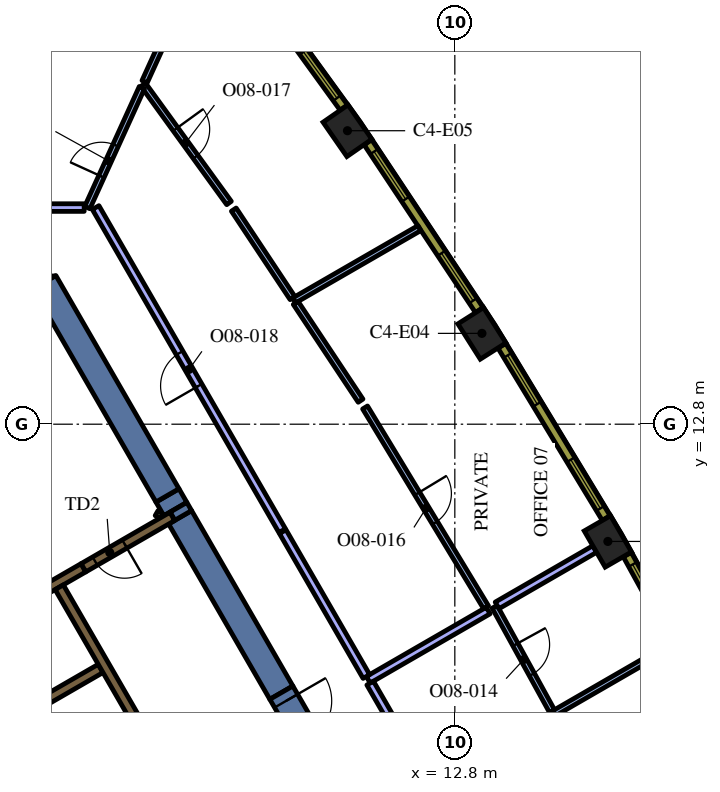
"""IFC4 building model, lengths in metres.
Left out: names, types, materials, properties, quantities, classifications, styles, units other than length and angle.
Written with IfcOpenShell. Run it as: python <this file> out.ifc"""

import sys

from ifc_helpers import new_model, si_unit, direction, frame, frame_2d, origin, origin_2d, place, context, subcontext, project, spatial, polyline, rectangle, outline, extrude, element, fill, save


model = new_model("IFC4")
c1 = context("Model", 3, precision=1e-05, world=origin(), true_north=direction((0.0, 1.0)))
c2 = subcontext(c1, "Body", "Model", "MODEL_VIEW")
j1 = project(units=[si_unit("LENGTHUNIT", "METRE"), si_unit("PLANEANGLEUNIT", "RADIAN")], contexts=[c1])
p1 = place(None, origin())
s1 = spatial("IfcSite", under=j1, at=p1, CompositionType="ELEMENT")
p2 = place(p1, origin())
s2 = spatial("IfcBuilding", under=s1, at=p2, CompositionType="ELEMENT")
p3 = place(p2, frame((0.0, 0.0, 226.8)))
s3 = spatial("IfcBuildingStorey", under=s2, at=p3, CompositionType="ELEMENT", Elevation=226.8)
for number, where, z_axis, x_axis in (
    (1, (16.827, 9.715, 0.0), (0.0, 0.0, 1.0), (-0.5, 0.866, 0.0)),
    (2, (13.513, 15.19, 0.0), (0.0, 0.0, 1.0), (-0.536, 0.845, 0.0)),
    (3, (9.975, 20.522, 0.0), (0.0, 0.0, 1.0), (-0.57, 0.822, 0.0)),
):
    element("IfcColumn", number, at=place(p3, frame(where, z_axis=z_axis, x_axis=x_axis)), inside=s3, PredefinedType="COLUMN", context=c2, shape_type="SweptSolid", body=[
        extrude(rectangle(XDim=1.1, YDim=0.8, at=origin_2d()), origin(), (0.0, 0.0, 1.0), 4.2),
    ])
p4 = place(p3, frame((5.445, 10.569, 0.0), z_axis=(0.0, 0.0, 1.0), x_axis=(-0.500218351069, 0.865899302029, 0.0)))
e4 = element("IfcWall", 4, at=p4, inside=s3, PredefinedType="SOLIDWALL", context=c2, shape_type="SweptSolid", body=[
    extrude(rectangle(XDim=0.412, YDim=0.7, at=frame_2d((0.206, 0.0))), origin(), (0.0, 0.0, 1.0), 4.2),
])
p5 = place(p3, frame((5.571, 10.35, 0.0), z_axis=(0.0, 0.0, 1.0), x_axis=(0.499968379186, -0.8660436593, 0.0)))
e5 = element("IfcWall", 5, at=p5, inside=s3, PredefinedType="SOLIDWALL", context=c2, shape_type="SweptSolid", body=[
    extrude(rectangle(XDim=5.328, YDim=0.7, at=frame_2d((2.664, 0.0))), origin(), (0.0, 0.0, 1.0), 4.2),
])
p6 = place(p3, origin())
e6 = element("IfcWall", 6, at=p6, inside=s3, PredefinedType="SOLIDWALL", context=c2, shape_type="SweptSolid", body=[
    extrude(outline(polyline([(5.432, 10.272), (5.308, 10.487), (5.749, 10.742), (5.873, 10.527), (5.432, 10.272)])), origin(), (0.0, 0.0, 1.0), 4.2),
])
p7 = place(p3, frame((5.238, 10.927, 0.0), z_axis=(0.0, 0.0, 1.0), x_axis=(-0.499985607887, 0.866033712915, 0.0)))
e7 = element("IfcWall", 7, at=p7, inside=s3, PredefinedType="SOLIDWALL", context=c2, shape_type="SweptSolid", body=[
    extrude(rectangle(XDim=6.478, YDim=0.7, at=frame_2d((3.239, 0.0))), origin(), (0.0, 0.0, 1.0), 4.2),
])
e8 = element("IfcWall", 8, at=p6, inside=s3, PredefinedType="SOLIDWALL", context=c2, shape_type="SweptSolid", body=[
    extrude(outline(polyline([(1.501, 16.7), (2.277, 16.7), (1.695, 16.364), (1.501, 16.7)])), origin(), (0.0, 0.0, 1.0), 4.2),
])
p8 = place(p3, frame((3.028, 9.023, 0.0), z_axis=(0.0, 0.0, 1.0), x_axis=(-0.866036587186, -0.49998062928, 0.0)))
e9 = element("IfcWall", 9, at=p8, inside=s3, PredefinedType="SOLIDWALL", context=c2, shape_type="SweptSolid", body=[
    extrude(rectangle(XDim=3.384, YDim=0.25, at=frame_2d((1.692, 0.0))), origin(), (0.0, 0.0, 1.0), 4.2),
])
p9 = place(p3, frame((5.97, -2.591, 0.0), z_axis=(0.0, 0.0, 1.0), x_axis=(-0.499994469932, 0.866028596547, 0.0)))
e10 = element("IfcWall", 10, at=p9, inside=s3, PredefinedType="SOLIDWALL", context=c2, shape_type="SweptSolid", body=[
    extrude(rectangle(XDim=10.488, YDim=0.25, at=frame_2d((5.244, 0.0))), origin(), (0.0, 0.0, 1.0), 4.2),
])
p10 = place(p3, frame((1.574, 5.274, 0.0), z_axis=(0.0, 0.0, 1.0), x_axis=(0.866028486751, 0.499994660107, 0.0)))
e11 = element("IfcWall", 11, at=p10, inside=s3, PredefinedType="SOLIDWALL", context=c2, shape_type="SweptSolid", body=[
    extrude(rectangle(XDim=2.2, YDim=0.25, at=frame_2d((1.1, 0.0))), origin(), (0.0, 0.0, 1.0), 4.2),
])
p11 = place(p3, frame((4.98, 10.358, 0.0), z_axis=(0.0, 0.0, 1.0), x_axis=(0.500640202437, 0.86565546709, 0.0)))
e12 = element("IfcWall", 12, at=p11, inside=s3, PredefinedType="PARTITIONING", context=c2, shape_type="SweptSolid", body=[
    extrude(rectangle(XDim=0.146, YDim=0.15, at=frame_2d((0.073, 0.0))), origin(), (0.0, 0.0, 1.0), 3.45),
])
p12 = place(p3, frame((8.565, -2.185, 0.0), z_axis=(0.0, 0.0, 1.0), x_axis=(-0.499997954832, 0.866026584559, 0.0)))
e13 = element("IfcWall", 13, at=p12, inside=s3, PredefinedType="SOLIDWALL", context=c2, shape_type="SweptSolid", body=[
    extrude(rectangle(XDim=12.35, YDim=0.25, at=frame_2d((6.175, 0.0))), origin(), (0.0, 0.0, 1.0), 4.2),
])
p13 = place(p12, frame((0.585, 0.0, 0.0)))
e14 = element("IfcOpeningElement", 14, at=p13, cuts=e13, PredefinedType="OPENING", context=c2, shape_type="SweptSolid", body=[
    extrude(rectangle(XDim=1.1, YDim=2.1, at=frame_2d((0.55, 1.05))), frame((0.0, 0.135, 0.0), z_axis=(0.0, -1.0, 0.0), x_axis=(1.0, 0.0, 0.0)), (0.0, 0.0, 1.0), 0.27),
])
p14 = place(p3, frame((5.366, 10.373, 0.0), z_axis=(0.0, 0.0, 1.0), x_axis=(-0.866019956843, -0.50000943426, 0.0)))
e15 = element("IfcWall", 15, at=p14, inside=s3, PredefinedType="SOLIDWALL", context=c2, shape_type="SweptSolid", body=[
    extrude(rectangle(XDim=2.7, YDim=0.25, at=frame_2d((1.35, 0.0))), origin(), (0.0, 0.0, 1.0), 4.2),
])
p15 = place(p14, frame((1.45, 0.0, 0.0)))
e16 = element("IfcOpeningElement", 16, at=p15, cuts=e15, PredefinedType="OPENING", context=c2, shape_type="SweptSolid", body=[
    extrude(rectangle(XDim=0.9, YDim=2.1, at=frame_2d((0.45, 1.05))), frame((0.0, 0.135, 0.0), z_axis=(0.0, -1.0, 0.0), x_axis=(1.0, 0.0, 0.0)), (0.0, 0.0, 1.0), 0.27),
])
p16 = place(p3, frame((8.235, 5.736, 0.0), z_axis=(0.0, 0.0, 1.0), x_axis=(0.499954529098, -0.86605165483, 0.0)))
e17 = element("IfcWall", 17, at=p16, inside=s3, PredefinedType="SOLIDWALL", context=c2, shape_type="SweptSolid", body=[
    extrude(rectangle(XDim=1.7, YDim=0.7, at=frame_2d((0.85, 0.0))), origin(), (0.0, 0.0, 1.0), 4.2),
])
p17 = place(p16, frame((0.25, 0.0, 0.0)))
e18 = element("IfcOpeningElement", 18, at=p17, cuts=e17, PredefinedType="OPENING", context=c2, shape_type="SweptSolid", body=[
    extrude(rectangle(XDim=1.2, YDim=2.1, at=frame_2d((0.6, 1.05))), frame((0.0, 0.36, 0.0), z_axis=(0.0, -1.0, 0.0), x_axis=(1.0, 0.0, 0.0)), (0.0, 0.0, 1.0), 0.72),
])
p18 = place(p3, frame((15.394, 5.183, 0.0), z_axis=(0.0, 0.0, 1.0), x_axis=(0.866039935929, 0.499974828743, 0.0)))
e19 = element("IfcWall", 19, at=p18, inside=s3, PredefinedType="PARTITIONING", context=c2, shape_type="SweptSolid", body=[
    extrude(rectangle(XDim=3.601, YDim=0.15, at=frame_2d((1.8, 0.0))), origin(), (0.0, 0.0, 1.0), 3.45),
])
p19 = place(p3, frame((13.848, 7.995, 0.0), z_axis=(0.0, 0.0, 1.0), x_axis=(0.481894826099, -0.876229066272, 0.0)))
e20 = element("IfcWall", 20, at=p19, inside=s3, PredefinedType="PARTITIONING", context=c2, shape_type="SweptSolid", body=[
    extrude(rectangle(XDim=3.134, YDim=0.15, at=frame_2d((1.567, 0.0))), origin(), (0.0, 0.0, 1.0), 3.45),
])
p20 = place(p19, frame((1.134, 0.0, 0.0)))
e21 = element("IfcOpeningElement", 21, at=p20, cuts=e20, PredefinedType="OPENING", context=c2, shape_type="SweptSolid", body=[
    extrude(rectangle(XDim=0.9, YDim=2.1, at=frame_2d((0.45, 1.05))), frame((0.0, 0.085, 0.0), z_axis=(0.0, -1.0, 0.0), x_axis=(1.0, 0.0, 0.0)), (0.0, 0.0, 1.0), 0.17),
])
p21 = place(p3, frame((13.913, 8.032, 0.0), z_axis=(0.0, 0.0, 1.0), x_axis=(0.866015594979, 0.500016988964, 0.0)))
e22 = element("IfcWall", 22, at=p21, inside=s3, PredefinedType="PARTITIONING", context=c2, shape_type="SweptSolid", body=[
    extrude(rectangle(XDim=2.966, YDim=0.2, at=frame_2d((1.483, 0.0))), origin(), (0.0, 0.0, 1.0), 3.45),
])
p22 = place(p3, frame((10.522, 6.075, 0.0), z_axis=(0.0, 0.0, 1.0), x_axis=(0.866003708037, 0.500037576254, 0.0)))
e23 = element("IfcWall", 23, at=p22, inside=s3, PredefinedType="PARTITIONING", context=c2, shape_type="SweptSolid", body=[
    extrude(rectangle(XDim=3.644, YDim=0.2, at=frame_2d((1.822, 0.0))), origin(), (0.0, 0.0, 1.0), 3.45),
])
p23 = place(p3, frame((12.772, 2.178, 0.0), z_axis=(0.0, 0.0, 1.0), x_axis=(-0.50001224981, 0.866018331238, 0.0)))
e24 = element("IfcWall", 24, at=p23, inside=s3, PredefinedType="PARTITIONING", context=c2, shape_type="SweptSolid", body=[
    extrude(rectangle(XDim=4.4, YDim=0.2, at=frame_2d((2.2, 0.0))), origin(), (0.0, 0.0, 1.0), 3.45),
])
p24 = place(p3, frame((8.57, 16.056, 0.0), z_axis=(0.0, 0.0, 1.0), x_axis=(0.866000839906, 0.500042543472, 0.0)))
e25 = element("IfcWall", 25, at=p24, inside=s3, PredefinedType="PARTITIONING", context=c2, shape_type="SweptSolid", body=[
    extrude(rectangle(XDim=3.807, YDim=0.15, at=frame_2d((1.904, 0.0))), origin(), (0.0, 0.0, 1.0), 3.45),
])
p25 = place(p3, frame((10.439, 13.24, 0.0), z_axis=(0.0, 0.0, 1.0), x_axis=(0.517837859082, -0.855478785068, 0.0)))
e26 = element("IfcWall", 26, at=p25, inside=s3, PredefinedType="PARTITIONING", context=c2, shape_type="SweptSolid", body=[
    extrude(rectangle(XDim=6.148, YDim=0.15, at=frame_2d((3.074, 0.0))), origin(), (0.0, 0.0, 1.0), 3.45),
])
p26 = place(p25, frame((2.648, 0.0, 0.0)))
e27 = element("IfcOpeningElement", 27, at=p26, cuts=e26, PredefinedType="OPENING", context=c2, shape_type="SweptSolid", body=[
    extrude(rectangle(XDim=0.9, YDim=2.1, at=frame_2d((0.45, 1.05))), frame((0.0, 0.085, 0.0), z_axis=(0.0, -1.0, 0.0), x_axis=(1.0, 0.0, 0.0)), (0.0, 0.0, 1.0), 0.17),
])
p27 = place(p3, frame((10.32, 13.419, 0.0), z_axis=(0.0, 0.0, 1.0), x_axis=(-0.552857215969, 0.833276003945, 0.0)))
e28 = element("IfcWall", 28, at=p27, inside=s3, PredefinedType="PARTITIONING", context=c2, shape_type="SweptSolid", body=[
    extrude(rectangle(XDim=3.09, YDim=0.15, at=frame_2d((1.545, 0.0))), origin(), (0.0, 0.0, 1.0), 3.45),
])
p28 = place(p3, frame((8.529, 16.118, 0.0), z_axis=(0.0, 0.0, 1.0), x_axis=(-0.552884246744, 0.833258069089, 0.0)))
e29 = element("IfcWall", 29, at=p28, inside=s3, PredefinedType="PARTITIONING", context=c2, shape_type="SweptSolid", body=[
    extrude(rectangle(XDim=2.794, YDim=0.15, at=frame_2d((1.397, 0.0))), origin(), (0.0, 0.0, 1.0), 3.45),
])
p29 = place(p3, frame((4.601, 21.733, 0.0), z_axis=(0.0, 0.0, 1.0), x_axis=(0.587031033917, -0.809564429319, 0.0)))
e30 = element("IfcWall", 30, at=p29, inside=s3, PredefinedType="PARTITIONING", context=c2, shape_type="SweptSolid", body=[
    extrude(rectangle(XDim=3.845, YDim=0.15, at=frame_2d((1.923, 0.0))), origin(), (0.0, 0.0, 1.0), 3.45),
])
p30 = place(p29, frame((1.445, 0.0, 0.0)))
e31 = element("IfcOpeningElement", 31, at=p30, cuts=e30, PredefinedType="OPENING", context=c2, shape_type="SweptSolid", body=[
    extrude(rectangle(XDim=0.9, YDim=2.1, at=frame_2d((0.45, 1.05))), frame((0.0, 0.085, 0.0), z_axis=(0.0, -1.0, 0.0), x_axis=(1.0, 0.0, 0.0)), (0.0, 0.0, 1.0), 0.17),
])
p31 = place(p3, frame((4.636, 21.812, 0.0), z_axis=(0.0, 0.0, 1.0), x_axis=(0.414322811892, 0.910129994861, 0.0)))
e32 = element("IfcWall", 32, at=p31, inside=s3, PredefinedType="PARTITIONING", context=c2, shape_type="SweptSolid", body=[
    extrude(rectangle(XDim=3.679, YDim=0.15, at=frame_2d((1.84, 0.0))), origin(), (0.0, 0.0, 1.0), 3.45),
])
p32 = place(p3, frame((3.129, 18.5, 0.0), z_axis=(0.0, 0.0, 1.0), x_axis=(0.414291096557, 0.910144432117, 0.0)))
e33 = element("IfcWall", 33, at=p32, inside=s3, PredefinedType="PARTITIONING", context=c2, shape_type="SweptSolid", body=[
    extrude(rectangle(XDim=3.466, YDim=0.15, at=frame_2d((1.733, 0.0))), origin(), (0.0, 0.0, 1.0), 3.45),
])
p33 = place(p32, frame((0.9, 0.0, 0.0)))
e34 = element("IfcOpeningElement", 34, at=p33, cuts=e33, PredefinedType="OPENING", context=c2, shape_type="SweptSolid", body=[
    extrude(rectangle(XDim=0.9, YDim=2.1, at=frame_2d((0.45, 1.05))), frame((0.0, 0.085, 0.0), z_axis=(0.0, -1.0, 0.0), x_axis=(1.0, 0.0, 0.0)), (0.0, 0.0, 1.0), 0.17),
])
p34 = place(p3, frame((10.472, 6.162, 0.0), z_axis=(0.0, 0.0, 1.0), x_axis=(-0.499988222896, 0.866032203192, 0.0)))
e35 = element("IfcWall", 35, at=p34, inside=s3, PredefinedType="PARTITIONING", context=c2, shape_type="SweptSolid", body=[
    extrude(rectangle(XDim=4.4, YDim=0.2, at=frame_2d((2.2, 0.0))), origin(), (0.0, 0.0, 1.0), 3.45),
])
p35 = place(p3, frame((8.257, 9.998, 0.0), z_axis=(0.0, 0.0, 1.0), x_axis=(-0.499987955211, 0.866032357735, 0.0)))
e36 = element("IfcWall", 36, at=p35, inside=s3, PredefinedType="PARTITIONING", context=c2, shape_type="SweptSolid", body=[
    extrude(rectangle(XDim=9.817, YDim=0.2, at=frame_2d((4.909, 0.0))), origin(), (0.0, 0.0, 1.0), 3.45),
])
p36 = place(p35, frame((4.4, 0.0, 0.0)))
e37 = element("IfcOpeningElement", 37, at=p36, cuts=e36, PredefinedType="OPENING", context=c2, shape_type="SweptSolid", body=[
    extrude(rectangle(XDim=1.0, YDim=2.1, at=frame_2d((0.5, 1.05))), frame((0.0, 0.11, 0.0), z_axis=(0.0, -1.0, 0.0), x_axis=(1.0, 0.0, 0.0)), (0.0, 0.0, 1.0), 0.22),
])
p37 = place(p3, frame((3.046, 18.5, 0.0), z_axis=(0.0, 0.0, 1.0), x_axis=(-1.0, 0.0, 0.0)))
e38 = element("IfcWall", 38, at=p37, inside=s3, PredefinedType="PARTITIONING", context=c2, shape_type="SweptSolid", body=[
    extrude(rectangle(XDim=6.065, YDim=0.2, at=frame_2d((3.033, 0.0))), origin(), (0.0, 0.0, 1.0), 3.45),
])
p38 = place(p3, frame((19.892, 4.725, 0.0), z_axis=(0.0, 0.0, 1.0), x_axis=(-0.481925825015, 0.876212017256, 0.0)))
e39 = element("IfcWall", 39, at=p38, inside=s3, PredefinedType="SOLIDWALL", context=c2, shape_type="SweptSolid", body=[
    extrude(rectangle(XDim=5.299, YDim=0.24, at=frame_2d((2.649, 0.0))), origin(), (0.0, 0.0, 1.0), 3.95),
])
p39 = place(p38, frame((0.295, 0.0, 0.9)))
e40 = element("IfcOpeningElement", 40, at=p39, cuts=e39, PredefinedType="OPENING", context=c2, shape_type="SweptSolid", body=[
    extrude(rectangle(XDim=1.5, YDim=2.55, at=frame_2d((0.75, 1.275))), frame((0.0, 0.13, 0.0), z_axis=(0.0, -1.0, 0.0), x_axis=(1.0, 0.0, 0.0)), (0.0, 0.0, 1.0), 0.26),
])
p40 = place(p38, frame((3.504, 0.0, 0.9)))
e41 = element("IfcOpeningElement", 41, at=p40, cuts=e39, PredefinedType="OPENING", context=c2, shape_type="SweptSolid", body=[
    extrude(rectangle(XDim=1.5, YDim=2.55, at=frame_2d((0.75, 1.275))), frame((0.0, 0.13, 0.0), z_axis=(0.0, -1.0, 0.0), x_axis=(1.0, 0.0, 0.0)), (0.0, 0.0, 1.0), 0.26),
])
p41 = place(p3, frame((16.782, 10.331, 0.0), z_axis=(0.0, 0.0, 1.0), x_axis=(-0.517846166225, 0.855473756538, 0.0)))
e42 = element("IfcWall", 42, at=p41, inside=s3, PredefinedType="SOLIDWALL", context=c2, shape_type="SweptSolid", body=[
    extrude(rectangle(XDim=5.298, YDim=0.24, at=frame_2d((2.649, 0.0))), origin(), (0.0, 0.0, 1.0), 3.95),
])
p42 = place(p41, frame((0.294, 0.0, 0.9)))
e43 = element("IfcOpeningElement", 43, at=p42, cuts=e42, PredefinedType="OPENING", context=c2, shape_type="SweptSolid", body=[
    extrude(rectangle(XDim=1.5, YDim=2.55, at=frame_2d((0.75, 1.275))), frame((0.0, 0.13, 0.0), z_axis=(0.0, -1.0, 0.0), x_axis=(1.0, 0.0, 0.0)), (0.0, 0.0, 1.0), 0.26),
])
p43 = place(p41, frame((3.504, 0.0, 0.9)))
e44 = element("IfcOpeningElement", 44, at=p43, cuts=e42, PredefinedType="OPENING", context=c2, shape_type="SweptSolid", body=[
    extrude(rectangle(XDim=1.5, YDim=2.55, at=frame_2d((0.75, 1.275))), frame((0.0, 0.13, 0.0), z_axis=(0.0, -1.0, 0.0), x_axis=(1.0, 0.0, 0.0)), (0.0, 0.0, 1.0), 0.26),
])
p44 = place(p3, frame((13.442, 15.803, 0.0), z_axis=(0.0, 0.0, 1.0), x_axis=(-0.552901821755, 0.833246407433, 0.0)))
e45 = element("IfcWall", 45, at=p44, inside=s3, PredefinedType="SOLIDWALL", context=c2, shape_type="SweptSolid", body=[
    extrude(rectangle(XDim=5.298, YDim=0.24, at=frame_2d((2.649, 0.0))), origin(), (0.0, 0.0, 1.0), 3.95),
])
p45 = place(p44, frame((0.295, 0.0, 0.9)))
e46 = element("IfcOpeningElement", 46, at=p45, cuts=e45, PredefinedType="OPENING", context=c2, shape_type="SweptSolid", body=[
    extrude(rectangle(XDim=1.5, YDim=2.55, at=frame_2d((0.75, 1.275))), frame((0.0, 0.13, 0.0), z_axis=(0.0, -1.0, 0.0), x_axis=(1.0, 0.0, 0.0)), (0.0, 0.0, 1.0), 0.26),
])
p46 = place(p44, frame((3.504, 0.0, 0.9)))
e47 = element("IfcOpeningElement", 47, at=p46, cuts=e45, PredefinedType="OPENING", context=c2, shape_type="SweptSolid", body=[
    extrude(rectangle(XDim=1.5, YDim=2.55, at=frame_2d((0.75, 1.275))), frame((0.0, 0.13, 0.0), z_axis=(0.0, -1.0, 0.0), x_axis=(1.0, 0.0, 0.0)), (0.0, 0.0, 1.0), 0.26),
])
p47 = place(p3, frame((9.878, 21.132, 0.0), z_axis=(0.0, 0.0, 1.0), x_axis=(-0.586998456641, 0.80958805074, 0.0)))
e48 = element("IfcWall", 48, at=p47, inside=s3, PredefinedType="SOLIDWALL", context=c2, shape_type="SweptSolid", body=[
    extrude(rectangle(XDim=5.311, YDim=0.24, at=frame_2d((2.655, 0.0))), origin(), (0.0, 0.0, 1.0), 3.95),
])
p48 = place(p47, frame((0.306, 0.0, 0.9)))
e49 = element("IfcOpeningElement", 49, at=p48, cuts=e48, PredefinedType="OPENING", context=c2, shape_type="SweptSolid", body=[
    extrude(rectangle(XDim=1.5, YDim=2.55, at=frame_2d((0.75, 1.275))), frame((0.0, 0.13, 0.0), z_axis=(0.0, -1.0, 0.0), x_axis=(1.0, 0.0, 0.0)), (0.0, 0.0, 1.0), 0.26),
])
p49 = place(p47, frame((3.539, 0.0, 0.9)))
e50 = element("IfcOpeningElement", 50, at=p49, cuts=e48, PredefinedType="OPENING", context=c2, shape_type="SweptSolid", body=[
    extrude(rectangle(XDim=1.5, YDim=2.55, at=frame_2d((0.75, 1.275))), frame((0.0, 0.13, 0.0), z_axis=(0.0, -1.0, 0.0), x_axis=(1.0, 0.0, 0.0)), (0.0, 0.0, 1.0), 0.26),
])
p50 = place(p15, origin())
e51 = element("IfcDoor", 51, at=p50, inside=s3, OperationType="SINGLE_SWING_LEFT", PredefinedType="DOOR", context=c2, shape_type="SweptSolid", body=[
    extrude(rectangle(XDim=0.9, YDim=2.1, at=frame_2d((0.45, 1.05))), frame((0.0, 0.025, 0.0), z_axis=(0.0, -1.0, 0.0), x_axis=(1.0, 0.0, 0.0)), (0.0, 0.0, 1.0), 0.05),
])
fill(e16, e51)
p51 = place(p17, origin())
e52 = element("IfcDoor", 52, at=p51, inside=s3, OperationType="SINGLE_SWING_LEFT", PredefinedType="DOOR", context=c2, shape_type="SweptSolid", body=[
    extrude(rectangle(XDim=1.2, YDim=2.1, at=frame_2d((0.6, 1.05))), frame((0.0, 0.025, 0.0), z_axis=(0.0, -1.0, 0.0), x_axis=(1.0, 0.0, 0.0)), (0.0, 0.0, 1.0), 0.05),
])
fill(e18, e52)
p52 = place(p20, origin())
e53 = element("IfcDoor", 53, at=p52, inside=s3, OperationType="SINGLE_SWING_RIGHT", PredefinedType="DOOR", context=c2, shape_type="SweptSolid", body=[
    extrude(rectangle(XDim=0.9, YDim=2.1, at=frame_2d((0.45, 1.05))), frame((0.0, 0.025, 0.0), z_axis=(0.0, -1.0, 0.0), x_axis=(1.0, 0.0, 0.0)), (0.0, 0.0, 1.0), 0.05),
])
fill(e21, e53)
p53 = place(p26, origin())
e54 = element("IfcDoor", 54, at=p53, inside=s3, OperationType="SINGLE_SWING_RIGHT", PredefinedType="DOOR", context=c2, shape_type="SweptSolid", body=[
    extrude(rectangle(XDim=0.9, YDim=2.1, at=frame_2d((0.45, 1.05))), frame((0.0, 0.025, 0.0), z_axis=(0.0, -1.0, 0.0), x_axis=(1.0, 0.0, 0.0)), (0.0, 0.0, 1.0), 0.05),
])
fill(e27, e54)
p54 = place(p30, origin())
e55 = element("IfcDoor", 55, at=p54, inside=s3, OperationType="SINGLE_SWING_LEFT", PredefinedType="DOOR", context=c2, shape_type="SweptSolid", body=[
    extrude(rectangle(XDim=0.9, YDim=2.1, at=frame_2d((0.45, 1.05))), frame((0.0, 0.025, 0.0), z_axis=(0.0, -1.0, 0.0), x_axis=(1.0, 0.0, 0.0)), (0.0, 0.0, 1.0), 0.05),
])
fill(e31, e55)
p55 = place(p36, origin())
e56 = element("IfcDoor", 56, at=p55, inside=s3, OperationType="SINGLE_SWING_LEFT", PredefinedType="DOOR", context=c2, shape_type="SweptSolid", body=[
    extrude(rectangle(XDim=1.0, YDim=2.1, at=frame_2d((0.5, 1.05))), frame((0.0, 0.025, 0.0), z_axis=(0.0, -1.0, 0.0), x_axis=(1.0, 0.0, 0.0)), (0.0, 0.0, 1.0), 0.05),
])
fill(e37, e56)
p56 = place(p33, origin())
e57 = element("IfcDoor", 57, at=p56, inside=s3, OperationType="SINGLE_SWING_LEFT", PredefinedType="DOOR", context=c2, shape_type="SweptSolid", body=[
    extrude(rectangle(XDim=0.9, YDim=2.1, at=frame_2d((0.45, 1.05))), frame((0.0, 0.025, 0.0), z_axis=(0.0, -1.0, 0.0), x_axis=(1.0, 0.0, 0.0)), (0.0, 0.0, 1.0), 0.05),
])
fill(e34, e57)
p57 = place(p40, origin())
e58 = element("IfcWindow", 58, at=p57, inside=s3, PartitioningType="SINGLE_PANEL", PredefinedType="WINDOW", context=c2, shape_type="SweptSolid", body=[
    extrude(rectangle(XDim=1.5, YDim=2.55, at=frame_2d((0.75, 1.275))), frame((0.0, 0.04, 0.0), z_axis=(0.0, -1.0, 0.0), x_axis=(1.0, 0.0, 0.0)), (0.0, 0.0, 1.0), 0.06),
])
fill(e41, e58)
p58 = place(p42, origin())
e59 = element("IfcWindow", 59, at=p58, inside=s3, PartitioningType="SINGLE_PANEL", PredefinedType="WINDOW", context=c2, shape_type="SweptSolid", body=[
    extrude(rectangle(XDim=1.5, YDim=2.55, at=frame_2d((0.75, 1.275))), frame((0.0, 0.04, 0.0), z_axis=(0.0, -1.0, 0.0), x_axis=(1.0, 0.0, 0.0)), (0.0, 0.0, 1.0), 0.06),
])
fill(e43, e59)
p59 = place(p43, origin())
e60 = element("IfcWindow", 60, at=p59, inside=s3, PartitioningType="SINGLE_PANEL", PredefinedType="WINDOW", context=c2, shape_type="SweptSolid", body=[
    extrude(rectangle(XDim=1.5, YDim=2.55, at=frame_2d((0.75, 1.275))), frame((0.0, 0.04, 0.0), z_axis=(0.0, -1.0, 0.0), x_axis=(1.0, 0.0, 0.0)), (0.0, 0.0, 1.0), 0.06),
])
fill(e44, e60)
p60 = place(p45, origin())
e61 = element("IfcWindow", 61, at=p60, inside=s3, PartitioningType="SINGLE_PANEL", PredefinedType="WINDOW", context=c2, shape_type="SweptSolid", body=[
    extrude(rectangle(XDim=1.5, YDim=2.55, at=frame_2d((0.75, 1.275))), frame((0.0, 0.04, 0.0), z_axis=(0.0, -1.0, 0.0), x_axis=(1.0, 0.0, 0.0)), (0.0, 0.0, 1.0), 0.06),
])
fill(e46, e61)
p61 = place(p46, origin())
e62 = element("IfcWindow", 62, at=p61, inside=s3, PartitioningType="SINGLE_PANEL", PredefinedType="WINDOW", context=c2, shape_type="SweptSolid", body=[
    extrude(rectangle(XDim=1.5, YDim=2.55, at=frame_2d((0.75, 1.275))), frame((0.0, 0.04, 0.0), z_axis=(0.0, -1.0, 0.0), x_axis=(1.0, 0.0, 0.0)), (0.0, 0.0, 1.0), 0.06),
])
fill(e47, e62)
p62 = place(p48, origin())
e63 = element("IfcWindow", 63, at=p62, inside=s3, PartitioningType="SINGLE_PANEL", PredefinedType="WINDOW", context=c2, shape_type="SweptSolid", body=[
    extrude(rectangle(XDim=1.5, YDim=2.55, at=frame_2d((0.75, 1.275))), frame((0.0, 0.04, 0.0), z_axis=(0.0, -1.0, 0.0), x_axis=(1.0, 0.0, 0.0)), (0.0, 0.0, 1.0), 0.06),
])
fill(e49, e63)
save(model, sys.argv[1])
